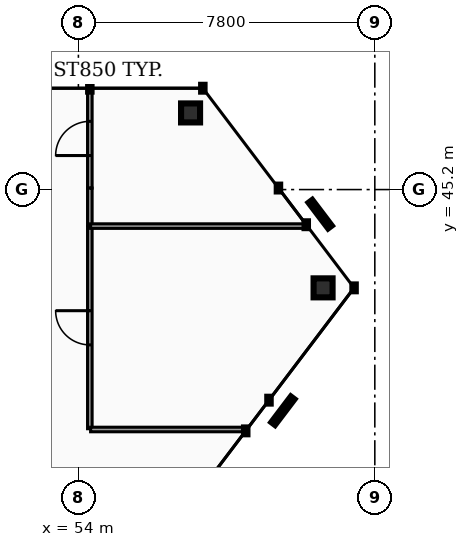
"""IFC4 building model, lengths in metres.
Left out: names, types, materials, properties, quantities, classifications, styles, units other than length and angle.
Written with IfcOpenShell. Run it as: python <this file> out.ifc"""

import sys

from ifc_helpers import new_model, si_unit, direction, frame, frame_2d, origin, origin_2d, place, context, subcontext, project, spatial, rectangle, hollow_rectangle, extrude, element, fill, save


model = new_model("IFC4")
c1 = context("Model", 3, precision=1e-05, world=origin(), true_north=direction((0.0, 1.0)))
c2 = subcontext(c1, "Body", "Model", "MODEL_VIEW")
j1 = project(units=[si_unit("LENGTHUNIT", "METRE"), si_unit("PLANEANGLEUNIT", "RADIAN")], contexts=[c1])
p1 = place(None, origin())
s1 = spatial("IfcSite", under=j1, at=p1, CompositionType="ELEMENT")
p2 = place(p1, origin())
s2 = spatial("IfcBuilding", under=s1, at=p2, CompositionType="ELEMENT")
p3 = place(p2, frame((0.0, 0.0, 261.8)))
s3 = spatial("IfcBuildingStorey", under=s2, at=p3, CompositionType="ELEMENT", Elevation=261.8)
for number, where, z_axis, x_axis in (
    (1, (56.952, 47.217, 0.0), (0.0, 0.0, 1.0), (1.0, 0.0, 0.0)),
    (2, (60.438, 42.614, 0.0), (0.0, 0.0, 1.0), (1.0, 0.0, 0.0)),
):
    element("IfcColumn", number, at=place(p3, frame(where, z_axis=z_axis, x_axis=x_axis)), inside=s3, PredefinedType="COLUMN", context=c2, shape_type="SweptSolid", body=[
        extrude(hollow_rectangle(XDim=0.5, YDim=0.5, WallThickness=0.025, at=origin_2d()), origin(), (0.0, 0.0, 1.0), 3.18),
    ])
p4 = place(p3, frame((54.301, 45.239, 0.0), z_axis=(0.0, 0.0, 1.0), x_axis=(0.0, 1.0, 0.0)))
e3 = element("IfcWall", 3, at=p4, inside=s3, PredefinedType="PARTITIONING", context=c2, shape_type="SweptSolid", body=[
    extrude(rectangle(XDim=2.613, YDim=0.12, at=frame_2d((1.307, 0.0))), origin(), (0.0, 0.0, 1.0), 2.235),
])
p5 = place(p4, frame((0.856, 0.0, 0.0)))
e4 = element("IfcOpeningElement", 4, at=p5, cuts=e3, PredefinedType="OPENING", context=c2, shape_type="SweptSolid", body=[
    extrude(rectangle(XDim=0.9, YDim=2.05, at=frame_2d((0.45, 1.025))), frame((0.0, 0.07, 0.0), z_axis=(0.0, -1.0, 0.0), x_axis=(1.0, 0.0, 0.0)), (0.0, 0.0, 1.0), 0.14),
])
p6 = place(p3, frame((54.301, 44.259, 0.0), z_axis=(0.0, 0.0, 1.0), x_axis=(0.0, 1.0, 0.0)))
e5 = element("IfcWall", 5, at=p6, inside=s3, PredefinedType="PARTITIONING", context=c2, shape_type="SweptSolid", body=[
    extrude(rectangle(XDim=0.98, YDim=0.12, at=frame_2d((0.49, 0.0))), origin(), (0.0, 0.0, 1.0), 2.235),
])
p7 = place(p3, frame((54.301, 38.907, 0.0), z_axis=(0.0, 0.0, 1.0), x_axis=(0.0, 1.0, 0.0)))
e6 = element("IfcWall", 6, at=p7, inside=s3, PredefinedType="PARTITIONING", context=c2, shape_type="SweptSolid", body=[
    extrude(rectangle(XDim=5.312, YDim=0.12, at=frame_2d((2.656, 0.0))), origin(), (0.0, 0.0, 1.0), 2.235),
])
p8 = place(p7, frame((2.206, 0.0, 0.0)))
e7 = element("IfcOpeningElement", 7, at=p8, cuts=e6, PredefinedType="OPENING", context=c2, shape_type="SweptSolid", body=[
    extrude(rectangle(XDim=0.9, YDim=2.05, at=frame_2d((0.45, 1.025))), frame((0.0, 0.07, 0.0), z_axis=(0.0, -1.0, 0.0), x_axis=(1.0, 0.0, 0.0)), (0.0, 0.0, 1.0), 0.14),
])
p9 = place(p3, frame((54.321, 38.887, 0.0), z_axis=(0.0, 0.0, 1.0), x_axis=(1.0, 0.0, 0.0)))
e8 = element("IfcWall", 8, at=p9, inside=s3, PredefinedType="PARTITIONING", context=c2, shape_type="SweptSolid", body=[
    extrude(rectangle(XDim=4.095, YDim=0.12, at=frame_2d((2.047, 0.0))), origin(), (0.0, 0.0, 1.0), 2.235),
])
p10 = place(p3, frame((54.321, 44.239, 0.0), z_axis=(0.0, 0.0, 1.0), x_axis=(1.0, 0.0, 0.0)))
e9 = element("IfcWall", 9, at=p10, inside=s3, PredefinedType="PARTITIONING", context=c2, shape_type="SweptSolid", body=[
    extrude(rectangle(XDim=5.687, YDim=0.12, at=frame_2d((2.844, 0.0))), origin(), (0.0, 0.0, 1.0), 2.235),
])
p11 = place(p5, origin())
e10 = element("IfcDoor", 10, at=p11, inside=s3, OperationType="SINGLE_SWING_LEFT", PredefinedType="DOOR", context=c2, shape_type="SweptSolid", body=[
    extrude(rectangle(XDim=0.9, YDim=2.05, at=frame_2d((0.45, 1.025))), frame((0.0, 0.025, 0.0), z_axis=(0.0, -1.0, 0.0), x_axis=(1.0, 0.0, 0.0)), (0.0, 0.0, 1.0), 0.05),
])
fill(e4, e10)
p12 = place(p8, origin())
e11 = element("IfcDoor", 11, at=p12, inside=s3, OperationType="SINGLE_SWING_RIGHT", PredefinedType="DOOR", context=c2, shape_type="SweptSolid", body=[
    extrude(rectangle(XDim=0.9, YDim=2.05, at=frame_2d((0.45, 1.025))), frame((0.0, 0.025, 0.0), z_axis=(0.0, -1.0, 0.0), x_axis=(1.0, 0.0, 0.0)), (0.0, 0.0, 1.0), 0.05),
])
fill(e7, e11)
save(model, sys.argv[1])
